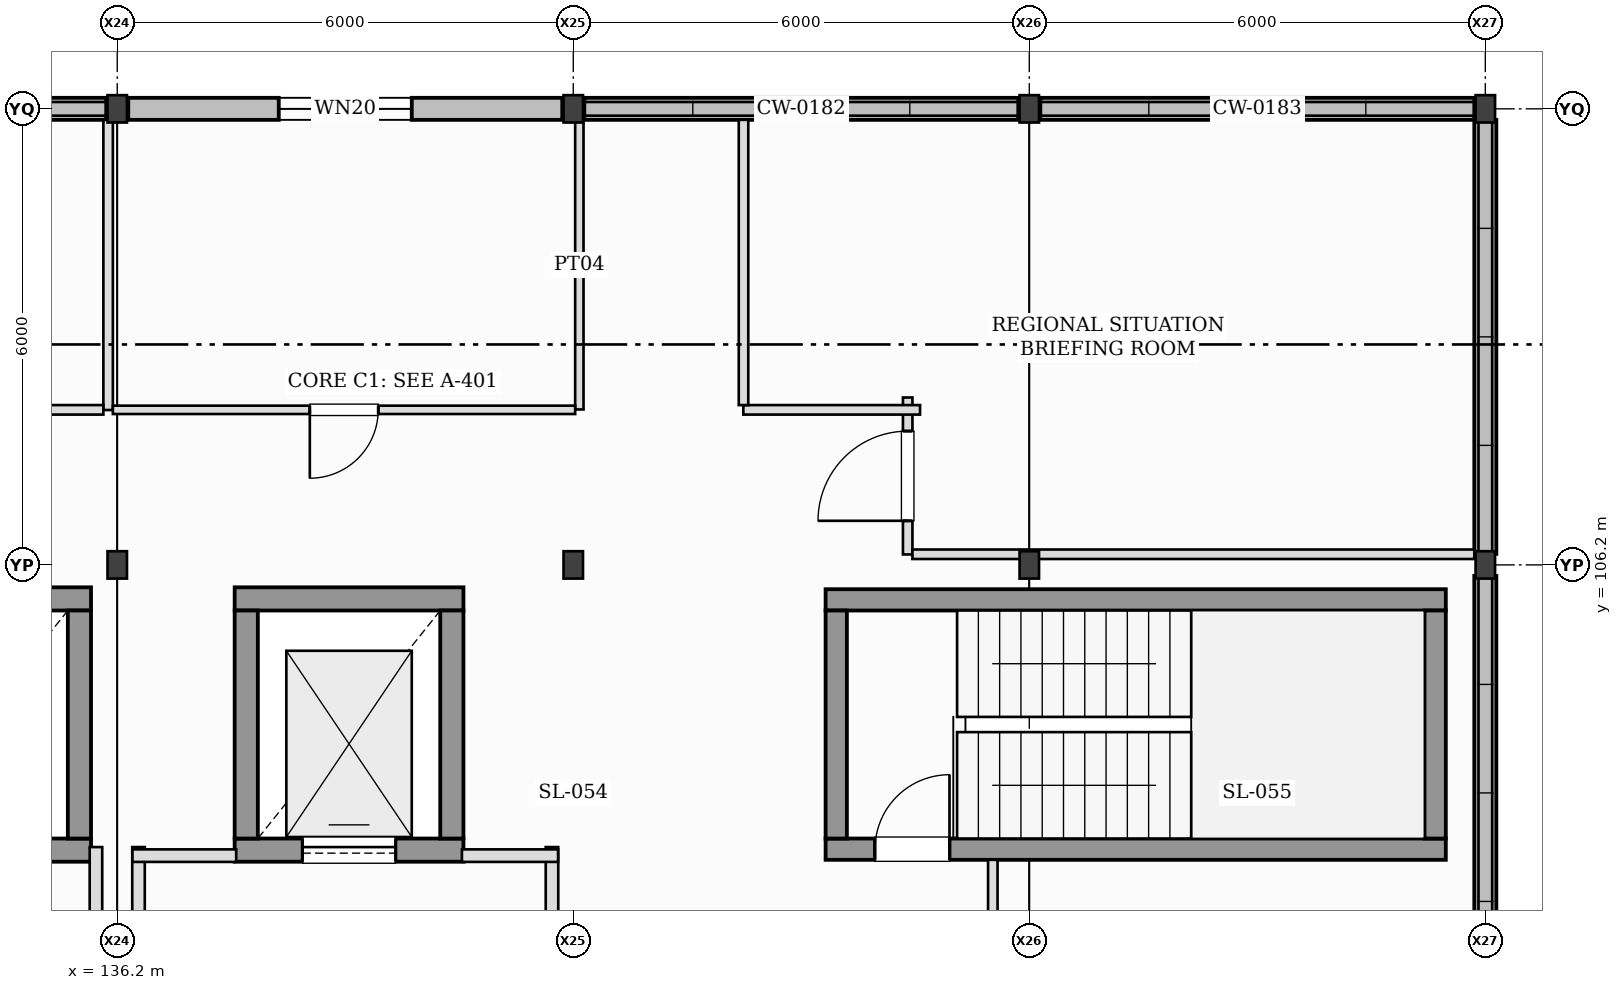
"""IFC4 building model, lengths in metres.
Left out: names, types, materials, properties, quantities, classifications, styles, units other than length and angle.
Written with IfcOpenShell. Run it as: python <this file> out.ifc"""

import sys

from ifc_helpers import new_model, si_unit, direction, frame, frame_2d, origin, origin_2d, place, context, subcontext, project, spatial, rectangle, i_section, extrude, element, fill, save


model = new_model("IFC4")
c1 = context("Model", 3, precision=1e-05, world=origin(), true_north=direction((0.0, 1.0)))
c2 = subcontext(c1, "Body", "Model", "MODEL_VIEW")
j1 = project(units=[si_unit("LENGTHUNIT", "METRE"), si_unit("PLANEANGLEUNIT", "RADIAN")], contexts=[c1])
p1 = place(None, origin())
s1 = spatial("IfcSite", under=j1, at=p1, CompositionType="ELEMENT")
p2 = place(p1, origin())
s2 = spatial("IfcBuilding", under=s1, at=p2, CompositionType="ELEMENT")
p3 = place(p2, frame((0.0, 0.0, 18.0)))
s3 = spatial("IfcBuildingStorey", under=s2, at=p3, CompositionType="ELEMENT", Elevation=18.0)
for number, where, z_axis, x_axis in (
    (1, (136.2, 106.2, 0.0), (0.0, 0.0, 1.0), (1.0, 0.0, 0.0)),
    (2, (136.2, 112.2, 0.0), (0.0, 0.0, 1.0), (1.0, 0.0, 0.0)),
    (3, (142.2, 106.2, 0.0), (0.0, 0.0, 1.0), (1.0, 0.0, 0.0)),
    (4, (142.2, 112.2, 0.0), (0.0, 0.0, 1.0), (1.0, 0.0, 0.0)),
    (5, (148.2, 106.2, 0.0), (0.0, 0.0, 1.0), (1.0, 0.0, 0.0)),
    (6, (148.2, 112.2, 0.0), (0.0, 0.0, 1.0), (1.0, 0.0, 0.0)),
    (7, (154.2, 106.2, 0.0), (0.0, 0.0, 1.0), (1.0, 0.0, 0.0)),
    (8, (154.2, 112.2, 0.0), (0.0, 0.0, 1.0), (1.0, 0.0, 0.0)),
):
    element("IfcColumn", number, at=place(p3, frame(where, z_axis=z_axis, x_axis=x_axis)), inside=s3, PredefinedType="COLUMN", context=c2, shape_type="SweptSolid", body=[
        extrude(i_section(OverallWidth=0.256, OverallDepth=0.36, WebThickness=0.011, FlangeThickness=0.02, at=origin_2d()), origin(), (0.0, 0.0, 1.0), 3.6),
    ])
p4 = place(p3, frame((136.055, 112.2, 0.0), z_axis=(0.0, 0.0, 1.0), x_axis=(-1.0, 0.0, 0.0)))
e9 = element("IfcWall", 9, at=p4, inside=s3, PredefinedType="STANDARD", context=c2, shape_type="SweptSolid", body=[
    extrude(rectangle(XDim=5.71, YDim=0.29, at=frame_2d((2.855, 0.0))), origin(), (0.0, 0.0, 1.0), 0.56),
])
p5 = place(p3, frame((142.055, 112.2, 0.0), z_axis=(0.0, 0.0, 1.0), x_axis=(-1.0, 0.0, 0.0)))
e10 = element("IfcWall", 10, at=p5, inside=s3, PredefinedType="STANDARD", context=c2, shape_type="SweptSolid", body=[
    extrude(rectangle(XDim=5.71, YDim=0.29, at=frame_2d((2.855, 0.0))), origin(), (0.0, 0.0, 1.0), 3.6),
])
p6 = place(p5, frame((1.98, 0.0, 0.85)))
e11 = element("IfcOpeningElement", 11, at=p6, cuts=e10, PredefinedType="OPENING", context=c2, shape_type="SweptSolid", body=[
    extrude(rectangle(XDim=1.75, YDim=1.75, at=frame_2d((0.875, 0.875))), frame((0.0, 0.155, 0.0), z_axis=(0.0, -1.0, 0.0), x_axis=(1.0, 0.0, 0.0)), (0.0, 0.0, 1.0), 0.31),
])
p7 = place(p3, frame((148.055, 112.2, 0.0), z_axis=(0.0, 0.0, 1.0), x_axis=(-1.0, 0.0, 0.0)))
e12 = element("IfcWall", 12, at=p7, inside=s3, PredefinedType="STANDARD", context=c2, shape_type="SweptSolid", body=[
    extrude(rectangle(XDim=5.71, YDim=0.29, at=frame_2d((2.855, 0.0))), origin(), (0.0, 0.0, 1.0), 0.68),
])
p8 = place(p3, frame((154.055, 112.2, 0.0), z_axis=(0.0, 0.0, 1.0), x_axis=(-1.0, 0.0, 0.0)))
e13 = element("IfcWall", 13, at=p8, inside=s3, PredefinedType="STANDARD", context=c2, shape_type="SweptSolid", body=[
    extrude(rectangle(XDim=5.71, YDim=0.29, at=frame_2d((2.855, 0.0))), origin(), (0.0, 0.0, 1.0), 0.8),
])
p9 = place(p3, frame((154.2, 100.345, 0.0), z_axis=(0.0, 0.0, 1.0), x_axis=(0.0, 1.0, 0.0)))
e14 = element("IfcWall", 14, at=p9, inside=s3, PredefinedType="STANDARD", context=c2, shape_type="SweptSolid", body=[
    extrude(rectangle(XDim=5.71, YDim=0.29, at=frame_2d((2.855, 0.0))), origin(), (0.0, 0.0, 1.0), 0.56),
])
p10 = place(p3, frame((154.2, 106.345, 0.0), z_axis=(0.0, 0.0, 1.0), x_axis=(0.0, 1.0, 0.0)))
e15 = element("IfcWall", 15, at=p10, inside=s3, PredefinedType="STANDARD", context=c2, shape_type="SweptSolid", body=[
    extrude(rectangle(XDim=5.71, YDim=0.29, at=frame_2d((2.855, 0.0))), origin(), (0.0, 0.0, 1.0), 0.68),
])
p11 = place(p3, frame((145.52, 102.46, 0.0), z_axis=(0.0, 0.0, 1.0), x_axis=(1.0, 0.0, 0.0)))
e16 = element("IfcWall", 16, at=p11, inside=s3, PredefinedType="SHEAR", context=c2, shape_type="SweptSolid", body=[
    extrude(rectangle(XDim=8.16, YDim=0.28, at=frame_2d((4.08, 0.0))), origin(), (0.0, 0.0, 1.0), 3.45),
])
p12 = place(p11, frame((0.65, 0.0, 0.0)))
e17 = element("IfcOpeningElement", 17, at=p12, cuts=e16, PredefinedType="OPENING", context=c2, shape_type="SweptSolid", body=[
    extrude(rectangle(XDim=0.98, YDim=2.15, at=frame_2d((0.49, 1.075))), frame((0.0, 0.15, 0.0), z_axis=(0.0, -1.0, 0.0), x_axis=(1.0, 0.0, 0.0)), (0.0, 0.0, 1.0), 0.3),
])
p13 = place(p3, frame((153.68, 105.74, 0.0), z_axis=(0.0, 0.0, 1.0), x_axis=(-1.0, 0.0, 0.0)))
e18 = element("IfcWall", 18, at=p13, inside=s3, PredefinedType="SHEAR", context=c2, shape_type="SweptSolid", body=[
    extrude(rectangle(XDim=8.16, YDim=0.28, at=frame_2d((4.08, 0.0))), origin(), (0.0, 0.0, 1.0), 3.45),
])
for number, where, z_axis, x_axis in (
    (19, (145.66, 105.6, 0.0), (0.0, 0.0, 1.0), (0.0, -1.0, 0.0)),
    (20, (153.54, 102.6, 0.0), (0.0, 0.0, 1.0), (0.0, 1.0, 0.0)),
):
    element("IfcWall", number, at=place(p3, frame(where, z_axis=z_axis, x_axis=x_axis)), inside=s3, PredefinedType="SHEAR", context=c2, shape_type="SweptSolid", body=[
        extrude(rectangle(XDim=3.0, YDim=0.28, at=frame_2d((1.5, 0.0))), origin(), (0.0, 0.0, 1.0), 3.45),
    ])
p14 = place(p3, frame((132.845, 102.448, 0.0), z_axis=(0.0, 0.0, 1.0), x_axis=(1.0, 0.0, 0.0)))
e21 = element("IfcWall", 21, at=p14, inside=s3, PredefinedType="SHEAR", context=c2, shape_type="SweptSolid", body=[
    extrude(rectangle(XDim=3.01, YDim=0.305, at=frame_2d((1.505, 0.0))), origin(), (0.0, 0.0, 1.0), 3.45),
])
p15 = place(p14, frame((0.895, 0.0, 0.0)))
e22 = element("IfcOpeningElement", 22, at=p15, cuts=e21, PredefinedType="OPENING", context=c2, shape_type="SweptSolid", body=[
    extrude(rectangle(XDim=1.22, YDim=2.22, at=frame_2d((0.61, 1.11))), frame((0.0, 0.162, 0.0), z_axis=(0.0, -1.0, 0.0), x_axis=(1.0, 0.0, 0.0)), (0.0, 0.0, 1.0), 0.325),
])
p16 = place(p3, frame((135.855, 105.752, 0.0), z_axis=(0.0, 0.0, 1.0), x_axis=(-1.0, 0.0, 0.0)))
e23 = element("IfcWall", 23, at=p16, inside=s3, PredefinedType="SHEAR", context=c2, shape_type="SweptSolid", body=[
    extrude(rectangle(XDim=3.01, YDim=0.305, at=frame_2d((1.505, 0.0))), origin(), (0.0, 0.0, 1.0), 3.45),
])
p17 = place(p3, frame((135.702, 102.6, 0.0), z_axis=(0.0, 0.0, 1.0), x_axis=(0.0, 1.0, 0.0)))
e24 = element("IfcWall", 24, at=p17, inside=s3, PredefinedType="SHEAR", context=c2, shape_type="SweptSolid", body=[
    extrude(rectangle(XDim=3.0, YDim=0.305, at=frame_2d((1.5, 0.0))), origin(), (0.0, 0.0, 1.0), 3.45),
])
p18 = place(p3, frame((135.92, 102.488, 0.0), z_axis=(0.0, 0.0, 1.0), x_axis=(0.0, -1.0, 0.0)))
e25 = element("IfcWall", 25, at=p18, inside=s3, PredefinedType="PARTITIONING", context=c2, shape_type="SweptSolid", body=[
    extrude(rectangle(XDim=2.988, YDim=0.165, at=frame_2d((1.494, 0.0))), origin(), (0.0, 0.0, 1.0), 3.36),
])
p19 = place(p3, frame((137.745, 102.448, 0.0), z_axis=(0.0, 0.0, 1.0), x_axis=(1.0, 0.0, 0.0)))
e26 = element("IfcWall", 26, at=p19, inside=s3, PredefinedType="SHEAR", context=c2, shape_type="SweptSolid", body=[
    extrude(rectangle(XDim=3.01, YDim=0.305, at=frame_2d((1.505, 0.0))), origin(), (0.0, 0.0, 1.0), 3.45),
])
p20 = place(p19, frame((0.895, 0.0, 0.0)))
e27 = element("IfcOpeningElement", 27, at=p20, cuts=e26, PredefinedType="OPENING", context=c2, shape_type="SweptSolid", body=[
    extrude(rectangle(XDim=1.22, YDim=2.22, at=frame_2d((0.61, 1.11))), frame((0.0, 0.162, 0.0), z_axis=(0.0, -1.0, 0.0), x_axis=(1.0, 0.0, 0.0)), (0.0, 0.0, 1.0), 0.325),
])
p21 = place(p3, frame((140.755, 105.752, 0.0), z_axis=(0.0, 0.0, 1.0), x_axis=(-1.0, 0.0, 0.0)))
e28 = element("IfcWall", 28, at=p21, inside=s3, PredefinedType="SHEAR", context=c2, shape_type="SweptSolid", body=[
    extrude(rectangle(XDim=3.01, YDim=0.305, at=frame_2d((1.505, 0.0))), origin(), (0.0, 0.0, 1.0), 3.45),
])
for number, where, z_axis, x_axis in (
    (29, (137.897, 105.6, 0.0), (0.0, 0.0, 1.0), (0.0, -1.0, 0.0)),
    (30, (140.603, 102.6, 0.0), (0.0, 0.0, 1.0), (0.0, 1.0, 0.0)),
):
    element("IfcWall", number, at=place(p3, frame(where, z_axis=z_axis, x_axis=x_axis)), inside=s3, PredefinedType="SHEAR", context=c2, shape_type="SweptSolid", body=[
        extrude(rectangle(XDim=3.0, YDim=0.305, at=frame_2d((1.5, 0.0))), origin(), (0.0, 0.0, 1.0), 3.45),
    ])
p22 = place(p3, frame((136.48, 99.5, 0.0), z_axis=(0.0, 0.0, 1.0), x_axis=(0.0, 1.0, 0.0)))
e31 = element("IfcWall", 31, at=p22, inside=s3, PredefinedType="PARTITIONING", context=c2, shape_type="SweptSolid", body=[
    extrude(rectangle(XDim=2.988, YDim=0.165, at=frame_2d((1.494, 0.0))), origin(), (0.0, 0.0, 1.0), 3.36),
])
p23 = place(p3, frame((141.92, 102.488, 0.0), z_axis=(0.0, 0.0, 1.0), x_axis=(0.0, -1.0, 0.0)))
e32 = element("IfcWall", 32, at=p23, inside=s3, PredefinedType="PARTITIONING", context=c2, shape_type="SweptSolid", body=[
    extrude(rectangle(XDim=2.988, YDim=0.165, at=frame_2d((1.494, 0.0))), origin(), (0.0, 0.0, 1.0), 3.246),
])
p24 = place(p3, frame((136.4, 102.375, 0.0), z_axis=(0.0, 0.0, 1.0), x_axis=(1.0, 0.0, 0.0)))
e33 = element("IfcWall", 33, at=p24, inside=s3, PredefinedType="PARTITIONING", context=c2, shape_type="SweptSolid", body=[
    extrude(rectangle(XDim=1.365, YDim=0.165, at=frame_2d((0.683, 0.0))), origin(), (0.0, 0.0, 1.0), 3.36),
])
p25 = place(p3, frame((140.735, 102.375, 0.0), z_axis=(0.0, 0.0, 1.0), x_axis=(1.0, 0.0, 0.0)))
e34 = element("IfcWall", 34, at=p25, inside=s3, PredefinedType="PARTITIONING", context=c2, shape_type="SweptSolid", body=[
    extrude(rectangle(XDim=1.265, YDim=0.165, at=frame_2d((0.632, 0.0))), origin(), (0.0, 0.0, 1.0), 3.36),
])
p26 = place(p3, frame((136.08, 112.055, 0.0), z_axis=(0.0, 0.0, 1.0), x_axis=(0.0, -1.0, 0.0)))
e35 = element("IfcWall", 35, at=p26, inside=s3, PredefinedType="PARTITIONING", context=c2, shape_type="SweptSolid", body=[
    extrude(rectangle(XDim=3.817, YDim=0.125, at=frame_2d((1.909, 0.0))), origin(), (0.0, 0.0, 1.0), 3.36),
])
p27 = place(p3, frame((136.018, 108.24, 0.0), z_axis=(0.0, 0.0, 1.0), x_axis=(-1.0, 0.0, 0.0)))
e36 = element("IfcWall", 36, at=p27, inside=s3, PredefinedType="PARTITIONING", context=c2, shape_type="SweptSolid", body=[
    extrude(rectangle(XDim=2.38, YDim=0.125, at=frame_2d((1.19, 0.0))), origin(), (0.0, 0.0, 1.0), 3.36),
])
p28 = place(p27, frame((0.74, 0.0, 0.0)))
e37 = element("IfcOpeningElement", 37, at=p28, cuts=e36, PredefinedType="OPENING", context=c2, shape_type="SweptSolid", body=[
    extrude(rectangle(XDim=0.9, YDim=2.1, at=frame_2d((0.45, 1.05))), frame((0.0, 0.073, 0.0), z_axis=(0.0, -1.0, 0.0), x_axis=(1.0, 0.0, 0.0)), (0.0, 0.0, 1.0), 0.145),
])
p29 = place(p3, frame((142.28, 112.055, 0.0), z_axis=(0.0, 0.0, 1.0), x_axis=(0.0, -1.0, 0.0)))
e38 = element("IfcWall", 38, at=p29, inside=s3, PredefinedType="PARTITIONING", context=c2, shape_type="SweptSolid", body=[
    extrude(rectangle(XDim=3.81, YDim=0.11, at=frame_2d((1.905, 0.0))), origin(), (0.0, 0.0, 1.0), 3.36),
])
p30 = place(p3, frame((142.225, 108.24, 0.0), z_axis=(0.0, 0.0, 1.0), x_axis=(-1.0, 0.0, 0.0)))
e39 = element("IfcWall", 39, at=p30, inside=s3, PredefinedType="PARTITIONING", context=c2, shape_type="SweptSolid", body=[
    extrude(rectangle(XDim=6.083, YDim=0.11, at=frame_2d((3.041, 0.0))), origin(), (0.0, 0.0, 1.0), 3.36),
])
p31 = place(p30, frame((2.591, 0.0, 0.0)))
e40 = element("IfcOpeningElement", 40, at=p31, cuts=e39, PredefinedType="OPENING", context=c2, shape_type="SweptSolid", body=[
    extrude(rectangle(XDim=0.9, YDim=2.1, at=frame_2d((0.45, 1.05))), frame((0.0, 0.065, 0.0), z_axis=(0.0, -1.0, 0.0), x_axis=(1.0, 0.0, 0.0)), (0.0, 0.0, 1.0), 0.13),
])
p32 = place(p3, frame((146.6, 106.337, 0.0), z_axis=(0.0, 0.0, 1.0), x_axis=(0.0, 1.0, 0.0)))
e41 = element("IfcWall", 41, at=p32, inside=s3, PredefinedType="PARTITIONING", context=c2, shape_type="SweptSolid", body=[
    extrude(rectangle(XDim=2.065, YDim=0.125, at=frame_2d((1.033, 0.0))), origin(), (0.0, 0.0, 1.0), 3.36),
])
p33 = place(p32, frame((0.442, 0.0, 0.0)))
e42 = element("IfcOpeningElement", 42, at=p33, cuts=e41, PredefinedType="OPENING", context=c2, shape_type="SweptSolid", body=[
    extrude(rectangle(XDim=1.18, YDim=2.16, at=frame_2d((0.59, 1.08))), frame((0.0, 0.073, 0.0), z_axis=(0.0, -1.0, 0.0), x_axis=(1.0, 0.0, 0.0)), (0.0, 0.0, 1.0), 0.145),
])
p34 = place(p3, frame((146.762, 108.24, 0.0), z_axis=(0.0, 0.0, 1.0), x_axis=(-1.0, 0.0, 0.0)))
e43 = element("IfcWall", 43, at=p34, inside=s3, PredefinedType="PARTITIONING", context=c2, shape_type="SweptSolid", body=[
    extrude(rectangle(XDim=2.325, YDim=0.125, at=frame_2d((1.163, 0.0))), origin(), (0.0, 0.0, 1.0), 3.36),
])
p35 = place(p3, frame((144.44, 108.302, 0.0), z_axis=(0.0, 0.0, 1.0), x_axis=(0.0, 1.0, 0.0)))
e44 = element("IfcWall", 44, at=p35, inside=s3, PredefinedType="PARTITIONING", context=c2, shape_type="SweptSolid", body=[
    extrude(rectangle(XDim=3.752, YDim=0.125, at=frame_2d((1.876, 0.0))), origin(), (0.0, 0.0, 1.0), 3.36),
])
p36 = place(p3, frame((154.055, 106.34, 0.0), z_axis=(0.0, 0.0, 1.0), x_axis=(-1.0, 0.0, 0.0)))
e45 = element("IfcWall", 45, at=p36, inside=s3, PredefinedType="PARTITIONING", context=c2, shape_type="SweptSolid", body=[
    extrude(rectangle(XDim=7.392, YDim=0.125, at=frame_2d((3.696, 0.0))), origin(), (0.0, 0.0, 1.0), 3.36),
])
p37 = place(p3, frame((147.72, 99.603, 0.0), z_axis=(0.0, 0.0, 1.0), x_axis=(0.0, 1.0, 0.0)))
e46 = element("IfcWall", 46, at=p37, inside=s3, PredefinedType="PARTITIONING", context=c2, shape_type="SweptSolid", body=[
    extrude(rectangle(XDim=2.718, YDim=0.125, at=frame_2d((1.359, 0.0))), origin(), (0.0, 0.0, 1.0), 3.36),
])
p38 = place(p6, origin())
e47 = element("IfcWindow", 47, at=p38, inside=s3, PartitioningType="SINGLE_PANEL", PredefinedType="WINDOW", context=c2, shape_type="SweptSolid", body=[
    extrude(rectangle(XDim=1.75, YDim=1.75, at=frame_2d((0.875, 0.875))), frame((0.0, 0.03, 0.0), z_axis=(0.0, -1.0, 0.0), x_axis=(1.0, 0.0, 0.0)), (0.0, 0.0, 1.0), 0.06),
])
fill(e11, e47)
p39 = place(p2, frame((0.0, 0.0, 25.2)))
p40 = place(p39, frame((0.0, 0.0, -4.02)))
p41 = place(p40, frame((136.2, 107.6, -0.01)))
p42 = place(p41, frame((0.0, 0.0, 0.37)))
e48 = element("IfcWindow", 48, at=p42, inside=s3, PartitioningType="SINGLE_PANEL", PredefinedType="SKYLIGHT", context=c2, shape_type="SweptSolid", body=[
    extrude(rectangle(XDim=1.75, YDim=1.35, at=origin_2d()), origin(), (0.0, 0.0, 1.0), 0.06),
])
p43 = place(p40, frame((139.2, 107.6, -0.01)))
p44 = place(p43, frame((0.0, 0.0, 0.37)))
e49 = element("IfcWindow", 49, at=p44, inside=s3, PartitioningType="SINGLE_PANEL", PredefinedType="SKYLIGHT", context=c2, shape_type="SweptSolid", body=[
    extrude(rectangle(XDim=1.95, YDim=1.48, at=origin_2d()), origin(), (0.0, 0.0, 1.0), 0.06),
])
p45 = place(p40, frame((145.2, 107.6, -0.01)))
p46 = place(p45, frame((0.0, 0.0, 0.37)))
e50 = element("IfcWindow", 50, at=p46, inside=s3, PartitioningType="SINGLE_PANEL", PredefinedType="SKYLIGHT", context=c2, shape_type="SweptSolid", body=[
    extrude(rectangle(XDim=2.15, YDim=1.62, at=origin_2d()), origin(), (0.0, 0.0, 1.0), 0.06),
])
p47 = place(p40, frame((148.2, 107.6, -0.01)))
p48 = place(p47, frame((0.0, 0.0, 0.37)))
e51 = element("IfcWindow", 51, at=p48, inside=s3, PartitioningType="SINGLE_PANEL", PredefinedType="SKYLIGHT", context=c2, shape_type="SweptSolid", body=[
    extrude(rectangle(XDim=1.15, YDim=1.15, at=origin_2d()), origin(), (0.0, 0.0, 1.0), 0.06),
])
p49 = place(p40, frame((151.2, 107.6, -0.01)))
p50 = place(p49, frame((0.0, 0.0, 0.37)))
e52 = element("IfcWindow", 52, at=p50, inside=s3, PartitioningType="SINGLE_PANEL", PredefinedType="SKYLIGHT", context=c2, shape_type="SweptSolid", body=[
    extrude(rectangle(XDim=1.35, YDim=1.35, at=origin_2d()), origin(), (0.0, 0.0, 1.0), 0.06),
])
p51 = place(p12, origin())
e53 = element("IfcDoor", 53, at=p51, inside=s3, OperationType="SINGLE_SWING_RIGHT", PredefinedType="DOOR", context=c2, shape_type="SweptSolid", body=[
    extrude(rectangle(XDim=0.98, YDim=2.15, at=frame_2d((0.49, 1.075))), frame((0.0, 0.025, 0.0), z_axis=(0.0, -1.0, 0.0), x_axis=(1.0, 0.0, 0.0)), (0.0, 0.0, 1.0), 0.05),
])
fill(e17, e53)
p52 = place(p20, origin())
e54 = element("IfcDoor", 54, at=p52, inside=s3, OperationType="SLIDING_TO_LEFT", PredefinedType="DOOR", context=c2, shape_type="SweptSolid", body=[
    extrude(rectangle(XDim=1.22, YDim=2.22, at=frame_2d((0.61, 1.11))), frame((0.0, 0.025, 0.0), z_axis=(0.0, -1.0, 0.0), x_axis=(1.0, 0.0, 0.0)), (0.0, 0.0, 1.0), 0.05),
])
fill(e27, e54)
p53 = place(p31, frame((0.9, 0.0, 0.0), z_axis=(0.0, 0.0, 1.0), x_axis=(-1.0, 0.0, 0.0)))
e55 = element("IfcDoor", 55, at=p53, inside=s3, OperationType="SINGLE_SWING_RIGHT", PredefinedType="DOOR", context=c2, shape_type="SweptSolid", body=[
    extrude(rectangle(XDim=0.9, YDim=2.1, at=frame_2d((0.45, 1.05))), frame((0.0, 0.025, 0.0), z_axis=(0.0, -1.0, 0.0), x_axis=(1.0, 0.0, 0.0)), (0.0, 0.0, 1.0), 0.05),
])
fill(e40, e55)
p54 = place(p33, origin())
e56 = element("IfcDoor", 56, at=p54, inside=s3, OperationType="SINGLE_SWING_LEFT", PredefinedType="DOOR", context=c2, shape_type="SweptSolid", body=[
    extrude(rectangle(XDim=1.18, YDim=2.16, at=frame_2d((0.59, 1.08))), frame((0.0, 0.025, 0.0), z_axis=(0.0, -1.0, 0.0), x_axis=(1.0, 0.0, 0.0)), (0.0, 0.0, 1.0), 0.05),
])
fill(e42, e56)
save(model, sys.argv[1])
